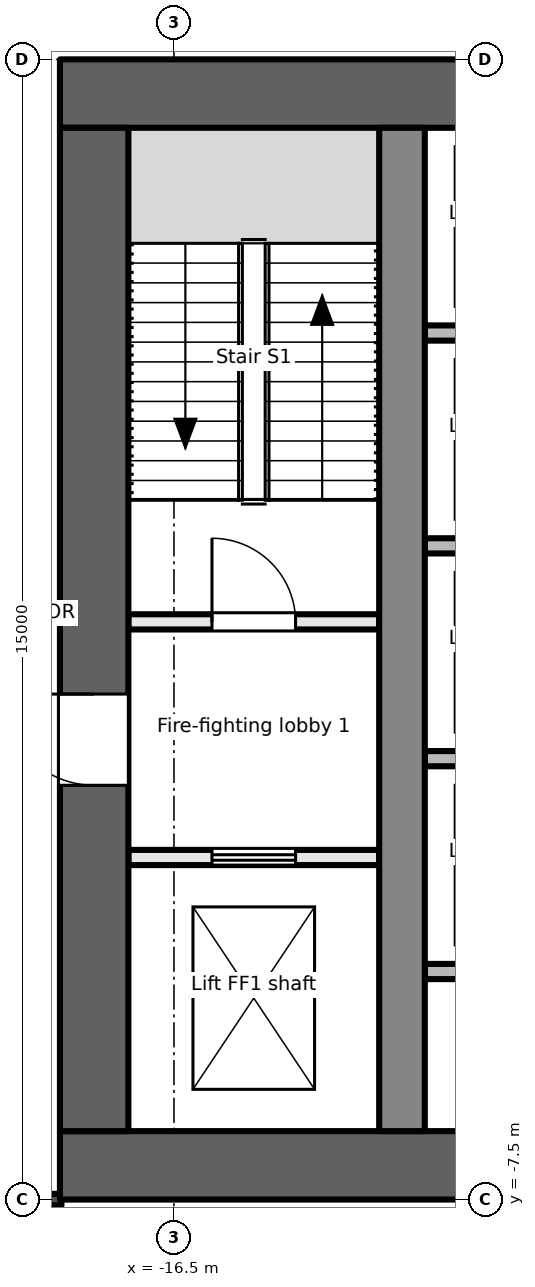
"""IFC4 building model, lengths in metres.
Left out: names, types, materials, properties, quantities, classifications, styles, units other than length and angle.
Written with IfcOpenShell. Run it as: python <this file> out.ifc"""

import sys

from ifc_helpers import new_model, si_unit, direction, frame, frame_2d, origin, place, context, subcontext, project, spatial, rectangle, extrude, element, fill, save


model = new_model("IFC4")
c1 = context("Model", 3, precision=1e-05, world=origin(), true_north=direction((0.0, 1.0)))
c2 = subcontext(c1, "Body", "Model", "MODEL_VIEW")
j1 = project(units=[si_unit("LENGTHUNIT", "METRE"), si_unit("PLANEANGLEUNIT", "RADIAN")], contexts=[c1])
p1 = place(None, origin())
s1 = spatial("IfcSite", under=j1, at=p1, CompositionType="ELEMENT")
p2 = place(p1, origin())
s2 = spatial("IfcBuilding", under=s1, at=p2, CompositionType="ELEMENT")
p3 = place(p2, frame((0.0, 0.0, 115.7)))
s3 = spatial("IfcBuildingStorey", under=s2, at=p3, CompositionType="ELEMENT", Elevation=115.7)
p4 = place(p3, frame((-18.0, -7.05, -0.2), z_axis=(0.0, 0.0, 1.0), x_axis=(1.0, 0.0, 0.0)))
e1 = element("IfcWall", 1, at=p4, inside=s3, PredefinedType="SHEAR", context=c2, shape_type="SweptSolid", body=[
    extrude(rectangle(XDim=36.0, YDim=0.9, at=frame_2d((18.0, 0.0))), origin(), (0.0, 0.0, 1.0), 5.0),
])
p5 = place(p4, frame((7.8, 0.0, 0.2)))
e2 = element("IfcOpeningElement", 2, at=p5, cuts=e1, PredefinedType="OPENING", context=c2, shape_type="SweptSolid", body=[
    extrude(rectangle(XDim=2.4, YDim=2.1, at=frame_2d((1.2, 1.05))), frame((0.0, 0.46, 0.0), z_axis=(0.0, -1.0, 0.0), x_axis=(1.0, 0.0, 0.0)), (0.0, 0.0, 1.0), 0.921),
])
p6 = place(p4, frame((17.4, 0.0, 0.2)))
e3 = element("IfcOpeningElement", 3, at=p6, cuts=e1, PredefinedType="OPENING", context=c2, shape_type="SweptSolid", body=[
    extrude(rectangle(XDim=1.2, YDim=2.1, at=frame_2d((0.6, 1.05))), frame((0.0, 0.46, 0.0), z_axis=(0.0, -1.0, 0.0), x_axis=(1.0, 0.0, 0.0)), (0.0, 0.0, 1.0), 0.921),
])
p7 = place(p4, frame((26.1, 0.0, 0.2)))
e4 = element("IfcOpeningElement", 4, at=p7, cuts=e1, PredefinedType="OPENING", context=c2, shape_type="SweptSolid", body=[
    extrude(rectangle(XDim=2.4, YDim=2.1, at=frame_2d((1.2, 1.05))), frame((0.0, 0.46, 0.0), z_axis=(0.0, -1.0, 0.0), x_axis=(1.0, 0.0, 0.0)), (0.0, 0.0, 1.0), 0.921),
])
p8 = place(p3, frame((-18.0, 7.05, -0.2), z_axis=(0.0, 0.0, 1.0), x_axis=(1.0, 0.0, 0.0)))
e5 = element("IfcWall", 5, at=p8, inside=s3, PredefinedType="SHEAR", context=c2, shape_type="SweptSolid", body=[
    extrude(rectangle(XDim=36.0, YDim=0.9, at=frame_2d((18.0, 0.0))), origin(), (0.0, 0.0, 1.0), 5.0),
])
p9 = place(p3, frame((-17.55, -6.6, -0.2), z_axis=(0.0, 0.0, 1.0), x_axis=(0.0, 1.0, 0.0)))
e6 = element("IfcWall", 6, at=p9, inside=s3, PredefinedType="SHEAR", context=c2, shape_type="SweptSolid", body=[
    extrude(rectangle(XDim=13.2, YDim=0.9, at=frame_2d((6.6, 0.0))), origin(), (0.0, 0.0, 1.0), 5.0),
])
p10 = place(p9, frame((4.55, 0.0, 0.2)))
e7 = element("IfcOpeningElement", 7, at=p10, cuts=e6, PredefinedType="OPENING", context=c2, shape_type="SweptSolid", body=[
    extrude(rectangle(XDim=1.2, YDim=2.1, at=frame_2d((0.6, 1.05))), frame((0.0, 0.46, 0.0), z_axis=(0.0, -1.0, 0.0), x_axis=(1.0, 0.0, 0.0)), (0.0, 0.0, 1.0), 0.921),
])
p11 = place(p3, frame((-13.5, -6.6, -0.2), z_axis=(0.0, 0.0, 1.0), x_axis=(0.0, 1.0, 0.0)))
e8 = element("IfcWall", 8, at=p11, inside=s3, PredefinedType="SHEAR", context=c2, shape_type="SweptSolid", body=[
    extrude(rectangle(XDim=13.2, YDim=0.6, at=frame_2d((6.6, 0.0))), origin(), (0.0, 0.0, 1.0), 5.0),
])
p12 = place(p3, frame((-17.1, -3.0, 0.0), z_axis=(0.0, 0.0, 1.0), x_axis=(1.0, 0.0, 0.0)))
e9 = element("IfcWall", 9, at=p12, inside=s3, PredefinedType="PARTITIONING", context=c2, shape_type="SweptSolid", body=[
    extrude(rectangle(XDim=3.3, YDim=0.2, at=frame_2d((1.65, 0.0))), origin(), (0.0, 0.0, 1.0), 4.8),
])
p13 = place(p12, frame((1.1, 0.0, 0.0)))
e10 = element("IfcOpeningElement", 10, at=p13, cuts=e9, PredefinedType="OPENING", context=c2, shape_type="SweptSolid", body=[
    extrude(rectangle(XDim=1.1, YDim=2.1, at=frame_2d((0.55, 1.05))), frame((0.0, 0.111, 0.0), z_axis=(0.0, -1.0, 0.0), x_axis=(1.0, 0.0, 0.0)), (0.0, 0.0, 1.0), 0.221),
])
p14 = place(p3, frame((-17.1, 0.1, 0.0), z_axis=(0.0, 0.0, 1.0), x_axis=(1.0, 0.0, 0.0)))
e11 = element("IfcWall", 11, at=p14, inside=s3, PredefinedType="PARTITIONING", context=c2, shape_type="SweptSolid", body=[
    extrude(rectangle(XDim=3.3, YDim=0.2, at=frame_2d((1.65, 0.0))), origin(), (0.0, 0.0, 1.0), 4.8),
])
p15 = place(p14, frame((1.1, 0.0, 0.0)))
e12 = element("IfcOpeningElement", 12, at=p15, cuts=e11, PredefinedType="OPENING", context=c2, shape_type="SweptSolid", body=[
    extrude(rectangle(XDim=1.1, YDim=2.1, at=frame_2d((0.55, 1.05))), frame((0.0, 0.111, 0.0), z_axis=(0.0, -1.0, 0.0), x_axis=(1.0, 0.0, 0.0)), (0.0, 0.0, 1.0), 0.221),
])
for number, where, z_axis, x_axis in (
    (13, (-13.2, -1.7, 0.0), (0.0, 0.0, 1.0), (1.0, 0.0, 0.0)),
    (14, (-13.2, 1.1, 0.0), (0.0, 0.0, 1.0), (1.0, 0.0, 0.0)),
    (15, (-13.2, 3.9, 0.0), (0.0, 0.0, 1.0), (1.0, 0.0, 0.0)),
    (16, (-13.2, -4.5, 0.0), (0.0, 0.0, 1.0), (1.0, 0.0, 0.0)),
):
    element("IfcWall", number, at=place(p3, frame(where, z_axis=z_axis, x_axis=x_axis)), inside=s3, PredefinedType="PARTITIONING", context=c2, shape_type="SweptSolid", body=[
        extrude(rectangle(XDim=2.3, YDim=0.2, at=frame_2d((1.15, 0.0))), origin(), (0.0, 0.0, 1.0), 4.8),
    ])
p16 = place(p3, frame((-20.275, -7.5, 0.0), z_axis=(0.0, 0.0, 1.0), x_axis=(1.0, 0.0, 0.0)))
e17 = element("IfcWall", 17, at=p16, inside=s3, PredefinedType="PARTITIONING", context=c2, shape_type="SweptSolid", body=[
    extrude(rectangle(XDim=2.295, YDim=0.15, at=frame_2d((1.147, 0.0))), origin(), (0.0, 0.0, 1.0), 4.8),
])
p17 = place(p13, origin())
e18 = element("IfcDoor", 18, at=p17, inside=s3, OperationType="DOUBLE_DOOR_SLIDING", PredefinedType="DOOR", context=c2, shape_type="SweptSolid", body=[
    extrude(rectangle(XDim=1.1, YDim=2.1, at=frame_2d((0.55, 1.05))), frame((0.0, 0.025, 0.0), z_axis=(0.0, -1.0, 0.0), x_axis=(1.0, 0.0, 0.0)), (0.0, 0.0, 1.0), 0.05),
])
fill(e10, e18)
p18 = place(p10, origin())
e19 = element("IfcDoor", 19, at=p18, inside=s3, OperationType="SINGLE_SWING_RIGHT", PredefinedType="DOOR", context=c2, shape_type="SweptSolid", body=[
    extrude(rectangle(XDim=1.2, YDim=2.1, at=frame_2d((0.6, 1.05))), frame((0.0, 0.025, 0.0), z_axis=(0.0, -1.0, 0.0), x_axis=(1.0, 0.0, 0.0)), (0.0, 0.0, 1.0), 0.05),
])
fill(e7, e19)
p19 = place(p15, origin())
e20 = element("IfcDoor", 20, at=p19, inside=s3, OperationType="SINGLE_SWING_LEFT", PredefinedType="DOOR", context=c2, shape_type="SweptSolid", body=[
    extrude(rectangle(XDim=1.1, YDim=2.1, at=frame_2d((0.55, 1.05))), frame((0.0, 0.025, 0.0), z_axis=(0.0, -1.0, 0.0), x_axis=(1.0, 0.0, 0.0)), (0.0, 0.0, 1.0), 0.05),
])
fill(e12, e20)
save(model, sys.argv[1])
